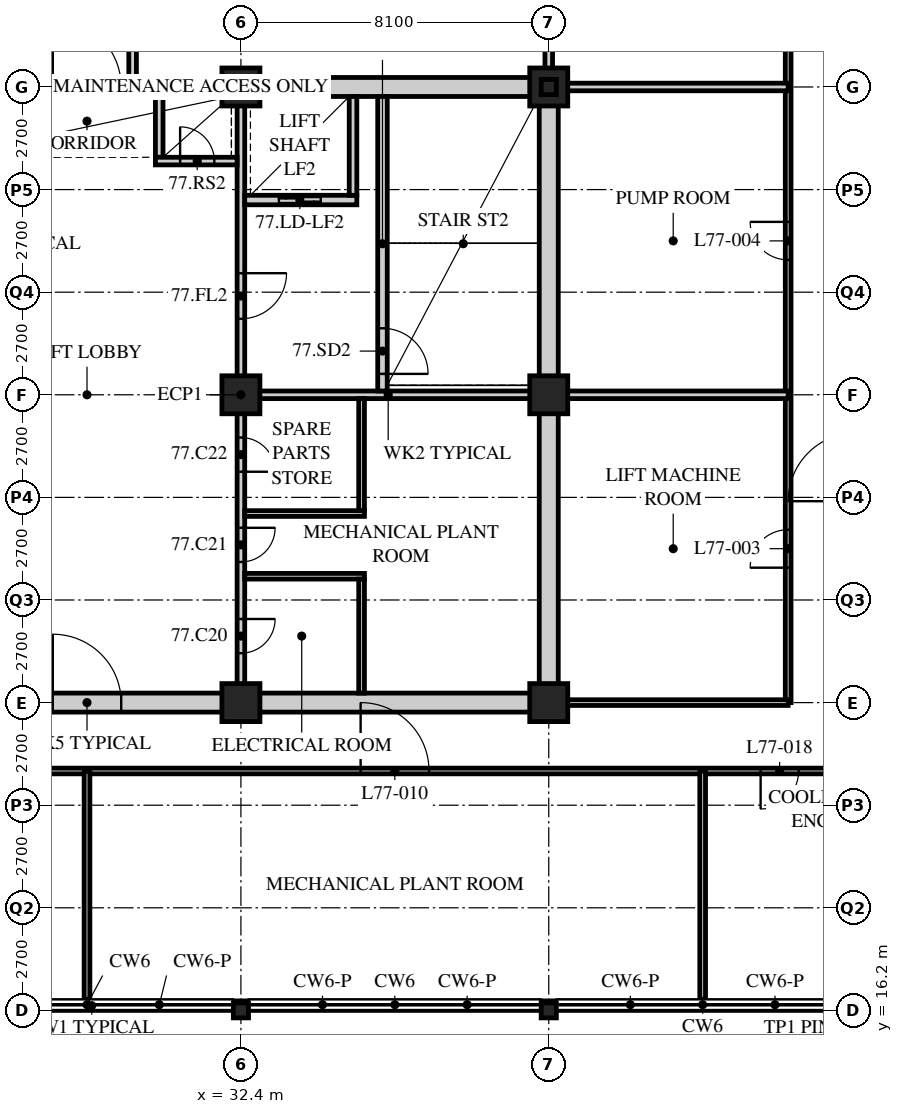
"""IFC4 building model, lengths in metres.
Left out: names, types, materials, properties, quantities, classifications, styles, units other than length and angle.
Written with IfcOpenShell. Run it as: python <this file> out.ifc"""

import sys

from ifc_helpers import new_model, si_unit, direction, frame, frame_2d, origin, origin_2d, place, context, subcontext, project, spatial, rectangle, hollow_rectangle, i_section, extrude, element, fill, save


model = new_model("IFC4")
c1 = context("Model", 3, precision=1e-05, world=origin(), true_north=direction((0.0, 1.0)))
c2 = subcontext(c1, "Body", "Model", "MODEL_VIEW")
j1 = project(units=[si_unit("LENGTHUNIT", "METRE"), si_unit("PLANEANGLEUNIT", "RADIAN")], contexts=[c1])
p1 = place(None, origin())
s1 = spatial("IfcSite", under=j1, at=p1, CompositionType="ELEMENT")
p2 = place(p1, origin())
s2 = spatial("IfcBuilding", under=s1, at=p2, CompositionType="ELEMENT")
p3 = place(p2, frame((0.0, 0.0, 303.9)))
s3 = spatial("IfcBuildingStorey", under=s2, at=p3, CompositionType="ELEMENT", Elevation=303.9)
p4 = place(p3, frame((32.4, 16.2, 0.0), z_axis=(0.0, 0.0, 1.0), x_axis=(1.0, 0.0, 0.0)))
e1 = element("IfcColumn", 1, at=p4, inside=s3, PredefinedType="COLUMN", context=c2, shape_type="SweptSolid", body=[
    extrude(i_section(OverallWidth=0.399, OverallDepth=0.394, WebThickness=0.023, FlangeThickness=0.037, FilletRadius=0.015, at=origin_2d()), origin(), (0.0, 0.0, 1.0), 6.0),
])
for number, where, z_axis, x_axis in (
    (2, (32.4, 24.3, 0.0), (0.0, 0.0, 1.0), (1.0, 0.0, 0.0)),
    (3, (32.4, 32.4, 0.0), (0.0, 0.0, 1.0), (1.0, 0.0, 0.0)),
    (4, (32.4, 40.5, 0.0), (0.0, 0.0, 1.0), (1.0, 0.0, 0.0)),
):
    element("IfcColumn", number, at=place(p3, frame(where, z_axis=z_axis, x_axis=x_axis)), inside=s3, PredefinedType="COLUMN", context=c2, shape_type="SweptSolid", body=[
        extrude(hollow_rectangle(XDim=1.0, YDim=1.0, WallThickness=0.1, at=origin_2d()), origin(), (0.0, 0.0, 1.0), 6.0),
    ])
p5 = place(p3, frame((40.5, 16.2, 0.0), z_axis=(0.0, 0.0, 1.0), x_axis=(1.0, 0.0, 0.0)))
e5 = element("IfcColumn", 5, at=p5, inside=s3, PredefinedType="COLUMN", context=c2, shape_type="SweptSolid", body=[
    extrude(i_section(OverallWidth=0.399, OverallDepth=0.394, WebThickness=0.023, FlangeThickness=0.037, FilletRadius=0.015, at=origin_2d()), origin(), (0.0, 0.0, 1.0), 6.0),
])
for number, where, z_axis, x_axis in (
    (6, (40.5, 24.3, 0.0), (0.0, 0.0, 1.0), (1.0, 0.0, 0.0)),
    (7, (40.5, 32.4, 0.0), (0.0, 0.0, 1.0), (1.0, 0.0, 0.0)),
    (8, (40.5, 40.5, 0.0), (0.0, 0.0, 1.0), (1.0, 0.0, 0.0)),
):
    element("IfcColumn", number, at=place(p3, frame(where, z_axis=z_axis, x_axis=x_axis)), inside=s3, PredefinedType="COLUMN", context=c2, shape_type="SweptSolid", body=[
        extrude(hollow_rectangle(XDim=1.0, YDim=1.0, WallThickness=0.1, at=origin_2d()), origin(), (0.0, 0.0, 1.0), 6.0),
    ])
p6 = place(p3, frame((8.35, 16.325, 6.0), z_axis=(0.0, 0.0, 1.0), x_axis=(1.0, 0.0, 0.0)))
e9 = element("IfcWall", 9, at=p6, inside=s3, PredefinedType="PARAPET", context=c2, shape_type="SweptSolid", body=[
    extrude(rectangle(XDim=40.25, YDim=0.25, at=frame_2d((20.125, 0.0))), origin(), (0.0, 0.0, 1.0), 1.285),
])
for number, where, z_axis, x_axis in (
    (10, (32.4, 40.5, 6.0), (0.0, 0.0, 1.0), (1.0, 0.0, 0.0)),
    (11, (40.5, 40.5, 6.0), (0.0, 0.0, 1.0), (1.0, 0.0, 0.0)),
):
    element("IfcColumn", number, at=place(p3, frame(where, z_axis=z_axis, x_axis=x_axis)), inside=s3, PredefinedType="COLUMN", context=c2, shape_type="SweptSolid", body=[
        extrude(hollow_rectangle(XDim=0.4, YDim=0.4, WallThickness=0.016, at=origin_2d()), origin(), (0.0, 0.0, 1.0), 13.896),
    ])
p7 = place(p3, frame((8.1, 22.5, 0.0), z_axis=(0.0, 0.0, 1.0), x_axis=(1.0, 0.0, 0.0)))
e12 = element("IfcWall", 12, at=p7, inside=s3, PredefinedType="PARTITIONING", context=c2, shape_type="SweptSolid", body=[
    extrude(rectangle(XDim=40.5, YDim=0.15, at=frame_2d((20.25, 0.0))), origin(), (0.0, 0.0, 1.0), 5.8),
])
p8 = place(p7, frame((11.25, 0.0, 0.0)))
e13 = element("IfcOpeningElement", 13, at=p8, cuts=e12, PredefinedType="OPENING", context=c2, shape_type="SweptSolid", body=[
    extrude(rectangle(XDim=1.8, YDim=2.4, at=frame_2d((0.9, 1.2))), frame((0.0, 0.085, 0.0), z_axis=(0.0, -1.0, 0.0), x_axis=(1.0, 0.0, 0.0)), (0.0, 0.0, 1.0), 0.17),
])
p9 = place(p7, frame((27.45, 0.0, 0.0)))
e14 = element("IfcOpeningElement", 14, at=p9, cuts=e12, PredefinedType="OPENING", context=c2, shape_type="SweptSolid", body=[
    extrude(rectangle(XDim=1.8, YDim=2.4, at=frame_2d((0.9, 1.2))), frame((0.0, 0.085, 0.0), z_axis=(0.0, -1.0, 0.0), x_axis=(1.0, 0.0, 0.0)), (0.0, 0.0, 1.0), 0.17),
])
p10 = place(p7, frame((1.525, 0.0, 0.0)))
e15 = element("IfcOpeningElement", 15, at=p10, cuts=e12, PredefinedType="OPENING", context=c2, shape_type="SweptSolid", body=[
    extrude(rectangle(XDim=1.0, YDim=2.1, at=frame_2d((0.5, 1.05))), frame((0.0, 0.085, 0.0), z_axis=(0.0, -1.0, 0.0), x_axis=(1.0, 0.0, 0.0)), (0.0, 0.0, 1.0), 0.17),
])
p11 = place(p7, frame((37.975, 0.0, 0.0)))
e16 = element("IfcOpeningElement", 16, at=p11, cuts=e12, PredefinedType="OPENING", context=c2, shape_type="SweptSolid", body=[
    extrude(rectangle(XDim=1.0, YDim=2.1, at=frame_2d((0.5, 1.05))), frame((0.0, 0.085, 0.0), z_axis=(0.0, -1.0, 0.0), x_axis=(1.0, 0.0, 0.0)), (0.0, 0.0, 1.0), 0.17),
])
p12 = place(p3, frame((46.8, 24.3, 0.0), z_axis=(0.0, 0.0, 1.0), x_axis=(0.0, 1.0, 0.0)))
e17 = element("IfcWall", 17, at=p12, inside=s3, PredefinedType="PARTITIONING", context=c2, shape_type="SweptSolid", body=[
    extrude(rectangle(XDim=30.6, YDim=0.15, at=frame_2d((15.3, 0.0))), origin(), (0.0, 0.0, 1.0), 5.8),
])
p13 = place(p12, frame((3.55, 0.0, 0.0)))
e18 = element("IfcOpeningElement", 18, at=p13, cuts=e17, PredefinedType="OPENING", context=c2, shape_type="SweptSolid", body=[
    extrude(rectangle(XDim=1.0, YDim=2.1, at=frame_2d((0.5, 1.05))), frame((0.0, 0.085, 0.0), z_axis=(0.0, -1.0, 0.0), x_axis=(1.0, 0.0, 0.0)), (0.0, 0.0, 1.0), 0.17),
])
p14 = place(p12, frame((11.65, 0.0, 0.0)))
e19 = element("IfcOpeningElement", 19, at=p14, cuts=e17, PredefinedType="OPENING", context=c2, shape_type="SweptSolid", body=[
    extrude(rectangle(XDim=1.0, YDim=2.1, at=frame_2d((0.5, 1.05))), frame((0.0, 0.085, 0.0), z_axis=(0.0, -1.0, 0.0), x_axis=(1.0, 0.0, 0.0)), (0.0, 0.0, 1.0), 0.17),
])
p15 = place(p3, frame((40.7, 24.3, 0.0), z_axis=(0.0, 0.0, 1.0), x_axis=(1.0, 0.0, 0.0)))
e20 = element("IfcWall", 20, at=p15, inside=s3, PredefinedType="PARTITIONING", context=c2, shape_type="SweptSolid", body=[
    extrude(rectangle(XDim=6.1, YDim=0.15, at=frame_2d((3.05, 0.0))), origin(), (0.0, 0.0, 1.0), 5.038),
])
p16 = place(p3, frame((40.5, 32.4, 0.0), z_axis=(0.0, 0.0, 1.0), x_axis=(1.0, 0.0, 0.0)))
e21 = element("IfcWall", 21, at=p16, inside=s3, PredefinedType="SOLIDWALL", context=c2, shape_type="SweptSolid", body=[
    extrude(rectangle(XDim=6.3, YDim=0.2, at=frame_2d((3.15, 0.0))), origin(), (0.0, 0.0, 1.0), 5.038),
])
p17 = place(p3, frame((40.5, 40.5, 0.0), z_axis=(0.0, 0.0, 1.0), x_axis=(0.0, 1.0, 0.0)))
e22 = element("IfcWall", 22, at=p17, inside=s3, PredefinedType="SOLIDWALL", context=c2, shape_type="SweptSolid", body=[
    extrude(rectangle(XDim=14.4, YDim=0.2, at=frame_2d((7.2, 0.0))), origin(), (0.0, 0.0, 1.0), 5.038),
])
p18 = place(p3, frame((29.55, 40.5, 0.0), z_axis=(0.0, 0.0, 1.0), x_axis=(0.0, 1.0, 0.0)))
e23 = element("IfcWall", 23, at=p18, inside=s3, PredefinedType="SOLIDWALL", context=c2, shape_type="SweptSolid", body=[
    extrude(rectangle(XDim=14.4, YDim=0.2, at=frame_2d((7.2, 0.0))), origin(), (0.0, 0.0, 1.0), 5.8),
])
p19 = place(p3, frame((40.5, 40.5, 0.0), z_axis=(0.0, 0.0, 1.0), x_axis=(1.0, 0.0, 0.0)))
e24 = element("IfcWall", 24, at=p19, inside=s3, PredefinedType="SOLIDWALL", context=c2, shape_type="SweptSolid", body=[
    extrude(rectangle(XDim=6.3, YDim=0.2, at=frame_2d((3.15, 0.0))), origin(), (0.0, 0.0, 1.0), 5.038),
])
for number, where, z_axis, x_axis in (
    (25, (28.35, 22.5, 0.0), (0.0, 0.0, 1.0), (0.0, -1.0, 0.0)),
    (26, (44.55, 22.5, 0.0), (0.0, 0.0, 1.0), (0.0, -1.0, 0.0)),
):
    element("IfcWall", number, at=place(p3, frame(where, z_axis=z_axis, x_axis=x_axis)), inside=s3, PredefinedType="PARTITIONING", context=c2, shape_type="SweptSolid", body=[
        extrude(rectangle(XDim=6.007, YDim=0.15, at=frame_2d((3.003, 0.0))), origin(), (0.0, 0.0, 1.0), 5.8),
    ])
p20 = place(p3, frame((15.95, 24.3, 0.0), z_axis=(0.0, 0.0, 1.0), x_axis=(1.0, 0.0, 0.0)))
e27 = element("IfcWall", 27, at=p20, inside=s3, PredefinedType="SOLIDWALL", context=c2, shape_type="SweptSolid", body=[
    extrude(rectangle(XDim=24.8, YDim=0.5, at=frame_2d((12.4, 0.0))), origin(), (0.0, 0.0, 1.0), 5.038),
])
p21 = place(p20, frame((11.5, 0.0, 0.0)))
e28 = element("IfcOpeningElement", 28, at=p21, cuts=e27, PredefinedType="OPENING", context=c2, shape_type="SweptSolid", body=[
    extrude(rectangle(XDim=1.8, YDim=2.4, at=frame_2d((0.9, 1.2))), frame((0.0, 0.26, 0.0), z_axis=(0.0, -1.0, 0.0), x_axis=(1.0, 0.0, 0.0)), (0.0, 0.0, 1.0), 0.52),
])
p22 = place(p3, frame((15.95, 40.5, 0.0), z_axis=(0.0, 0.0, 1.0), x_axis=(1.0, 0.0, 0.0)))
e29 = element("IfcWall", 29, at=p22, inside=s3, PredefinedType="SOLIDWALL", context=c2, shape_type="SweptSolid", body=[
    extrude(rectangle(XDim=24.8, YDim=0.5, at=frame_2d((12.4, 0.0))), origin(), (0.0, 0.0, 1.0), 5.038),
])
p23 = place(p22, frame((11.5, 0.0, 0.0)))
e30 = element("IfcOpeningElement", 30, at=p23, cuts=e29, PredefinedType="OPENING", context=c2, shape_type="SweptSolid", body=[
    extrude(rectangle(XDim=1.8, YDim=2.4, at=frame_2d((0.9, 1.2))), frame((0.0, 0.26, 0.0), z_axis=(0.0, -1.0, 0.0), x_axis=(1.0, 0.0, 0.0)), (0.0, 0.0, 1.0), 0.52),
])
p24 = place(p3, frame((40.5, 24.55, 0.0), z_axis=(0.0, 0.0, 1.0), x_axis=(0.0, 1.0, 0.0)))
e31 = element("IfcWall", 31, at=p24, inside=s3, PredefinedType="SOLIDWALL", context=c2, shape_type="SweptSolid", body=[
    extrude(rectangle(XDim=15.7, YDim=0.5, at=frame_2d((7.85, 0.0))), origin(), (0.0, 0.0, 1.0), 5.038),
])
p25 = place(p3, frame((32.3, 32.4, 0.0), z_axis=(0.0, 0.0, 1.0), x_axis=(1.0, 0.0, 0.0)))
e32 = element("IfcWall", 32, at=p25, inside=s3, PredefinedType="SOLIDWALL", context=c2, shape_type="SweptSolid", body=[
    extrude(rectangle(XDim=7.95, YDim=0.2, at=frame_2d((3.975, 0.0))), origin(), (0.0, 0.0, 1.0), 5.038),
])
p26 = place(p3, frame((32.4, 32.5, 0.0), z_axis=(0.0, 0.0, 1.0), x_axis=(0.0, 1.0, 0.0)))
e33 = element("IfcWall", 33, at=p26, inside=s3, PredefinedType="SOLIDWALL", context=c2, shape_type="SweptSolid", body=[
    extrude(rectangle(XDim=7.75, YDim=0.2, at=frame_2d((3.875, 0.0))), origin(), (0.0, 0.0, 1.0), 5.038),
])
p27 = place(p26, frame((1.9, 0.0, 0.0)))
e34 = element("IfcOpeningElement", 34, at=p27, cuts=e33, PredefinedType="OPENING", context=c2, shape_type="SweptSolid", body=[
    extrude(rectangle(XDim=1.2, YDim=2.1, at=frame_2d((0.6, 1.05))), frame((0.0, 0.11, 0.0), z_axis=(0.0, -1.0, 0.0), x_axis=(1.0, 0.0, 0.0)), (0.0, 0.0, 1.0), 0.22),
])
p28 = place(p3, frame((36.125, 32.5, 0.0), z_axis=(0.0, 0.0, 1.0), x_axis=(0.0, 1.0, 0.0)))
e35 = element("IfcWall", 35, at=p28, inside=s3, PredefinedType="SOLIDWALL", context=c2, shape_type="SweptSolid", body=[
    extrude(rectangle(XDim=7.75, YDim=0.25, at=frame_2d((3.875, 0.0))), origin(), (0.0, 0.0, 1.0), 5.8),
])
p29 = place(p28, frame((0.45, 0.0, 0.0)))
e36 = element("IfcOpeningElement", 36, at=p29, cuts=e35, PredefinedType="OPENING", context=c2, shape_type="SweptSolid", body=[
    extrude(rectangle(XDim=1.2, YDim=2.1, at=frame_2d((0.6, 1.05))), frame((0.0, 0.135, 0.0), z_axis=(0.0, -1.0, 0.0), x_axis=(1.0, 0.0, 0.0)), (0.0, 0.0, 1.0), 0.27),
])
p30 = place(p3, frame((32.5, 37.525, 0.0), z_axis=(0.0, 0.0, 1.0), x_axis=(1.0, 0.0, 0.0)))
e37 = element("IfcWall", 37, at=p30, inside=s3, PredefinedType="SOLIDWALL", context=c2, shape_type="SweptSolid", body=[
    extrude(rectangle(XDim=2.95, YDim=0.25, at=frame_2d((1.475, 0.0))), origin(), (0.0, 0.0, 1.0), 5.8),
])
p31 = place(p30, frame((0.9, 0.0, 0.0)))
e38 = element("IfcOpeningElement", 38, at=p31, cuts=e37, PredefinedType="OPENING", context=c2, shape_type="SweptSolid", body=[
    extrude(rectangle(XDim=1.1, YDim=2.4, at=frame_2d((0.55, 1.2))), frame((0.0, 0.135, 0.0), z_axis=(0.0, -1.0, 0.0), x_axis=(1.0, 0.0, 0.0)), (0.0, 0.0, 1.0), 0.27),
])
p32 = place(p3, frame((35.35, 37.65, 0.0), z_axis=(0.0, 0.0, 1.0), x_axis=(0.0, 1.0, 0.0)))
e39 = element("IfcWall", 39, at=p32, inside=s3, PredefinedType="SOLIDWALL", context=c2, shape_type="SweptSolid", body=[
    extrude(rectangle(XDim=2.6, YDim=0.2, at=frame_2d((1.3, 0.0))), origin(), (0.0, 0.0, 1.0), 5.8),
])
p33 = place(p3, frame((30.25, 38.65, 0.0), z_axis=(0.0, 0.0, 1.0), x_axis=(0.0, 1.0, 0.0)))
e40 = element("IfcWall", 40, at=p33, inside=s3, PredefinedType="SOLIDWALL", context=c2, shape_type="SweptSolid", body=[
    extrude(rectangle(XDim=1.6, YDim=0.2, at=frame_2d((0.8, 0.0))), origin(), (0.0, 0.0, 1.0), 5.8),
])
p34 = place(p3, frame((30.15, 38.55, 0.0), z_axis=(0.0, 0.0, 1.0), x_axis=(1.0, 0.0, 0.0)))
e41 = element("IfcWall", 41, at=p34, inside=s3, PredefinedType="SOLIDWALL", context=c2, shape_type="SweptSolid", body=[
    extrude(rectangle(XDim=2.15, YDim=0.2, at=frame_2d((1.075, 0.0))), origin(), (0.0, 0.0, 1.0), 5.8),
])
p35 = place(p34, frame((0.65, 0.0, 0.0)))
e42 = element("IfcOpeningElement", 42, at=p35, cuts=e41, PredefinedType="OPENING", context=c2, shape_type="SweptSolid", body=[
    extrude(rectangle(XDim=0.9, YDim=2.1, at=frame_2d((0.45, 1.05))), frame((0.0, 0.11, 0.0), z_axis=(0.0, -1.0, 0.0), x_axis=(1.0, 0.0, 0.0)), (0.0, 0.0, 1.0), 0.22),
])
p36 = place(p3, frame((32.4, 24.55, 0.0), z_axis=(0.0, 0.0, 1.0), x_axis=(0.0, 1.0, 0.0)))
e43 = element("IfcWall", 43, at=p36, inside=s3, PredefinedType="PARTITIONING", context=c2, shape_type="SweptSolid", body=[
    extrude(rectangle(XDim=7.75, YDim=0.2, at=frame_2d((3.875, 0.0))), origin(), (0.0, 0.0, 1.0), 5.038),
])
p37 = place(p36, frame((1.05, 0.0, 0.0)))
e44 = element("IfcOpeningElement", 44, at=p37, cuts=e43, PredefinedType="OPENING", context=c2, shape_type="SweptSolid", body=[
    extrude(rectangle(XDim=0.9, YDim=2.1, at=frame_2d((0.45, 1.05))), frame((0.0, 0.11, 0.0), z_axis=(0.0, -1.0, 0.0), x_axis=(1.0, 0.0, 0.0)), (0.0, 0.0, 1.0), 0.22),
])
p38 = place(p36, frame((3.45, 0.0, 0.0)))
e45 = element("IfcOpeningElement", 45, at=p38, cuts=e43, PredefinedType="OPENING", context=c2, shape_type="SweptSolid", body=[
    extrude(rectangle(XDim=0.9, YDim=2.1, at=frame_2d((0.45, 1.05))), frame((0.0, 0.11, 0.0), z_axis=(0.0, -1.0, 0.0), x_axis=(1.0, 0.0, 0.0)), (0.0, 0.0, 1.0), 0.22),
])
p39 = place(p36, frame((5.825, 0.0, 0.0)))
e46 = element("IfcOpeningElement", 46, at=p39, cuts=e43, PredefinedType="OPENING", context=c2, shape_type="SweptSolid", body=[
    extrude(rectangle(XDim=0.9, YDim=2.1, at=frame_2d((0.45, 1.05))), frame((0.0, 0.11, 0.0), z_axis=(0.0, -1.0, 0.0), x_axis=(1.0, 0.0, 0.0)), (0.0, 0.0, 1.0), 0.22),
])
for number, where, z_axis, x_axis in (
    (47, (32.5, 27.625, 0.0), (0.0, 0.0, 1.0), (1.0, 0.0, 0.0)),
    (48, (32.5, 29.275, 0.0), (0.0, 0.0, 1.0), (1.0, 0.0, 0.0)),
):
    element("IfcWall", number, at=place(p3, frame(where, z_axis=z_axis, x_axis=x_axis)), inside=s3, PredefinedType="PARTITIONING", context=c2, shape_type="SweptSolid", body=[
        extrude(rectangle(XDim=3.15, YDim=0.15, at=frame_2d((1.575, 0.0))), origin(), (0.0, 0.0, 1.0), 5.8),
    ])
p40 = place(p3, frame((35.575, 24.55, 0.0), z_axis=(0.0, 0.0, 1.0), x_axis=(0.0, 1.0, 0.0)))
e49 = element("IfcWall", 49, at=p40, inside=s3, PredefinedType="PARTITIONING", context=c2, shape_type="SweptSolid", body=[
    extrude(rectangle(XDim=3.0, YDim=0.15, at=frame_2d((1.5, 0.0))), origin(), (0.0, 0.0, 1.0), 5.8),
])
p41 = place(p3, frame((35.575, 29.35, 0.0), z_axis=(0.0, 0.0, 1.0), x_axis=(0.0, 1.0, 0.0)))
e50 = element("IfcWall", 50, at=p41, inside=s3, PredefinedType="PARTITIONING", context=c2, shape_type="SweptSolid", body=[
    extrude(rectangle(XDim=2.95, YDim=0.15, at=frame_2d((1.475, 0.0))), origin(), (0.0, 0.0, 1.0), 5.8),
])
p42 = place(p13, origin())
e51 = element("IfcDoor", 51, at=p42, inside=s3, OperationType="SINGLE_SWING_LEFT", PredefinedType="DOOR", context=c2, shape_type="SweptSolid", body=[
    extrude(rectangle(XDim=1.0, YDim=2.1, at=frame_2d((0.5, 1.05))), frame((0.0, 0.025, 0.0), z_axis=(0.0, -1.0, 0.0), x_axis=(1.0, 0.0, 0.0)), (0.0, 0.0, 1.0), 0.05),
])
fill(e18, e51)
p43 = place(p14, origin())
e52 = element("IfcDoor", 52, at=p43, inside=s3, OperationType="SINGLE_SWING_RIGHT", PredefinedType="DOOR", context=c2, shape_type="SweptSolid", body=[
    extrude(rectangle(XDim=1.0, YDim=2.1, at=frame_2d((0.5, 1.05))), frame((0.0, 0.025, 0.0), z_axis=(0.0, -1.0, 0.0), x_axis=(1.0, 0.0, 0.0)), (0.0, 0.0, 1.0), 0.05),
])
fill(e19, e52)
p44 = place(p9, origin())
e53 = element("IfcDoor", 53, at=p44, inside=s3, OperationType="DOUBLE_DOOR_SINGLE_SWING", PredefinedType="DOOR", context=c2, shape_type="SweptSolid", body=[
    extrude(rectangle(XDim=1.8, YDim=2.4, at=frame_2d((0.9, 1.2))), frame((0.0, 0.025, 0.0), z_axis=(0.0, -1.0, 0.0), x_axis=(1.0, 0.0, 0.0)), (0.0, 0.0, 1.0), 0.05),
])
fill(e14, e53)
p45 = place(p11, origin())
e54 = element("IfcDoor", 54, at=p45, inside=s3, OperationType="SINGLE_SWING_RIGHT", PredefinedType="DOOR", context=c2, shape_type="SweptSolid", body=[
    extrude(rectangle(XDim=1.0, YDim=2.1, at=frame_2d((0.5, 1.05))), frame((0.0, 0.025, 0.0), z_axis=(0.0, -1.0, 0.0), x_axis=(1.0, 0.0, 0.0)), (0.0, 0.0, 1.0), 0.05),
])
fill(e16, e54)
p46 = place(p37, origin())
e55 = element("IfcDoor", 55, at=p46, inside=s3, OperationType="SINGLE_SWING_LEFT", PredefinedType="DOOR", context=c2, shape_type="SweptSolid", body=[
    extrude(rectangle(XDim=0.9, YDim=2.1, at=frame_2d((0.45, 1.05))), frame((0.0, 0.025, 0.0), z_axis=(0.0, -1.0, 0.0), x_axis=(1.0, 0.0, 0.0)), (0.0, 0.0, 1.0), 0.05),
])
fill(e44, e55)
p47 = place(p38, origin())
e56 = element("IfcDoor", 56, at=p47, inside=s3, OperationType="SINGLE_SWING_LEFT", PredefinedType="DOOR", context=c2, shape_type="SweptSolid", body=[
    extrude(rectangle(XDim=0.9, YDim=2.1, at=frame_2d((0.45, 1.05))), frame((0.0, 0.025, 0.0), z_axis=(0.0, -1.0, 0.0), x_axis=(1.0, 0.0, 0.0)), (0.0, 0.0, 1.0), 0.05),
])
fill(e45, e56)
p48 = place(p39, origin())
e57 = element("IfcDoor", 57, at=p48, inside=s3, OperationType="SINGLE_SWING_RIGHT", PredefinedType="DOOR", context=c2, shape_type="SweptSolid", body=[
    extrude(rectangle(XDim=0.9, YDim=2.1, at=frame_2d((0.45, 1.05))), frame((0.0, 0.025, 0.0), z_axis=(0.0, -1.0, 0.0), x_axis=(1.0, 0.0, 0.0)), (0.0, 0.0, 1.0), 0.05),
])
fill(e46, e57)
p49 = place(p29, origin())
e58 = element("IfcDoor", 58, at=p49, inside=s3, OperationType="SINGLE_SWING_RIGHT", PredefinedType="DOOR", context=c2, shape_type="SweptSolid", body=[
    extrude(rectangle(XDim=1.2, YDim=2.1, at=frame_2d((0.6, 1.05))), frame((0.0, 0.025, 0.0), z_axis=(0.0, -1.0, 0.0), x_axis=(1.0, 0.0, 0.0)), (0.0, 0.0, 1.0), 0.05),
])
fill(e36, e58)
p50 = place(p27, origin())
e59 = element("IfcDoor", 59, at=p50, inside=s3, OperationType="SINGLE_SWING_LEFT", PredefinedType="DOOR", context=c2, shape_type="SweptSolid", body=[
    extrude(rectangle(XDim=1.2, YDim=2.1, at=frame_2d((0.6, 1.05))), frame((0.0, 0.025, 0.0), z_axis=(0.0, -1.0, 0.0), x_axis=(1.0, 0.0, 0.0)), (0.0, 0.0, 1.0), 0.05),
])
fill(e34, e59)
p51 = place(p35, origin())
e60 = element("IfcDoor", 60, at=p51, inside=s3, OperationType="SINGLE_SWING_LEFT", PredefinedType="DOOR", context=c2, shape_type="SweptSolid", body=[
    extrude(rectangle(XDim=0.9, YDim=2.1, at=frame_2d((0.45, 1.05))), frame((0.0, 0.025, 0.0), z_axis=(0.0, -1.0, 0.0), x_axis=(1.0, 0.0, 0.0)), (0.0, 0.0, 1.0), 0.05),
])
fill(e42, e60)
p52 = place(p31, origin())
e61 = element("IfcDoor", 61, at=p52, inside=s3, OperationType="DOUBLE_DOOR_SLIDING", PredefinedType="DOOR", context=c2, shape_type="SweptSolid", body=[
    extrude(rectangle(XDim=1.1, YDim=2.4, at=frame_2d((0.55, 1.2))), frame((0.0, 0.025, 0.0), z_axis=(0.0, -1.0, 0.0), x_axis=(1.0, 0.0, 0.0)), (0.0, 0.0, 1.0), 0.05),
])
fill(e38, e61)
p53 = place(p21, origin())
e62 = element("IfcDoor", 62, at=p53, inside=s3, OperationType="DOUBLE_DOOR_SINGLE_SWING", PredefinedType="DOOR", context=c2, shape_type="SweptSolid", body=[
    extrude(rectangle(XDim=1.8, YDim=2.4, at=frame_2d((0.9, 1.2))), frame((0.0, 0.025, 0.0), z_axis=(0.0, -1.0, 0.0), x_axis=(1.0, 0.0, 0.0)), (0.0, 0.0, 1.0), 0.05),
])
fill(e28, e62)
p54 = place(p23, origin())
e63 = element("IfcDoor", 63, at=p54, inside=s3, OperationType="DOUBLE_DOOR_SINGLE_SWING", PredefinedType="DOOR", context=c2, shape_type="SweptSolid", body=[
    extrude(rectangle(XDim=1.8, YDim=2.4, at=frame_2d((0.9, 1.2))), frame((0.0, 0.025, 0.0), z_axis=(0.0, -1.0, 0.0), x_axis=(1.0, 0.0, 0.0)), (0.0, 0.0, 1.0), 0.05),
])
fill(e30, e63)
save(model, sys.argv[1])
